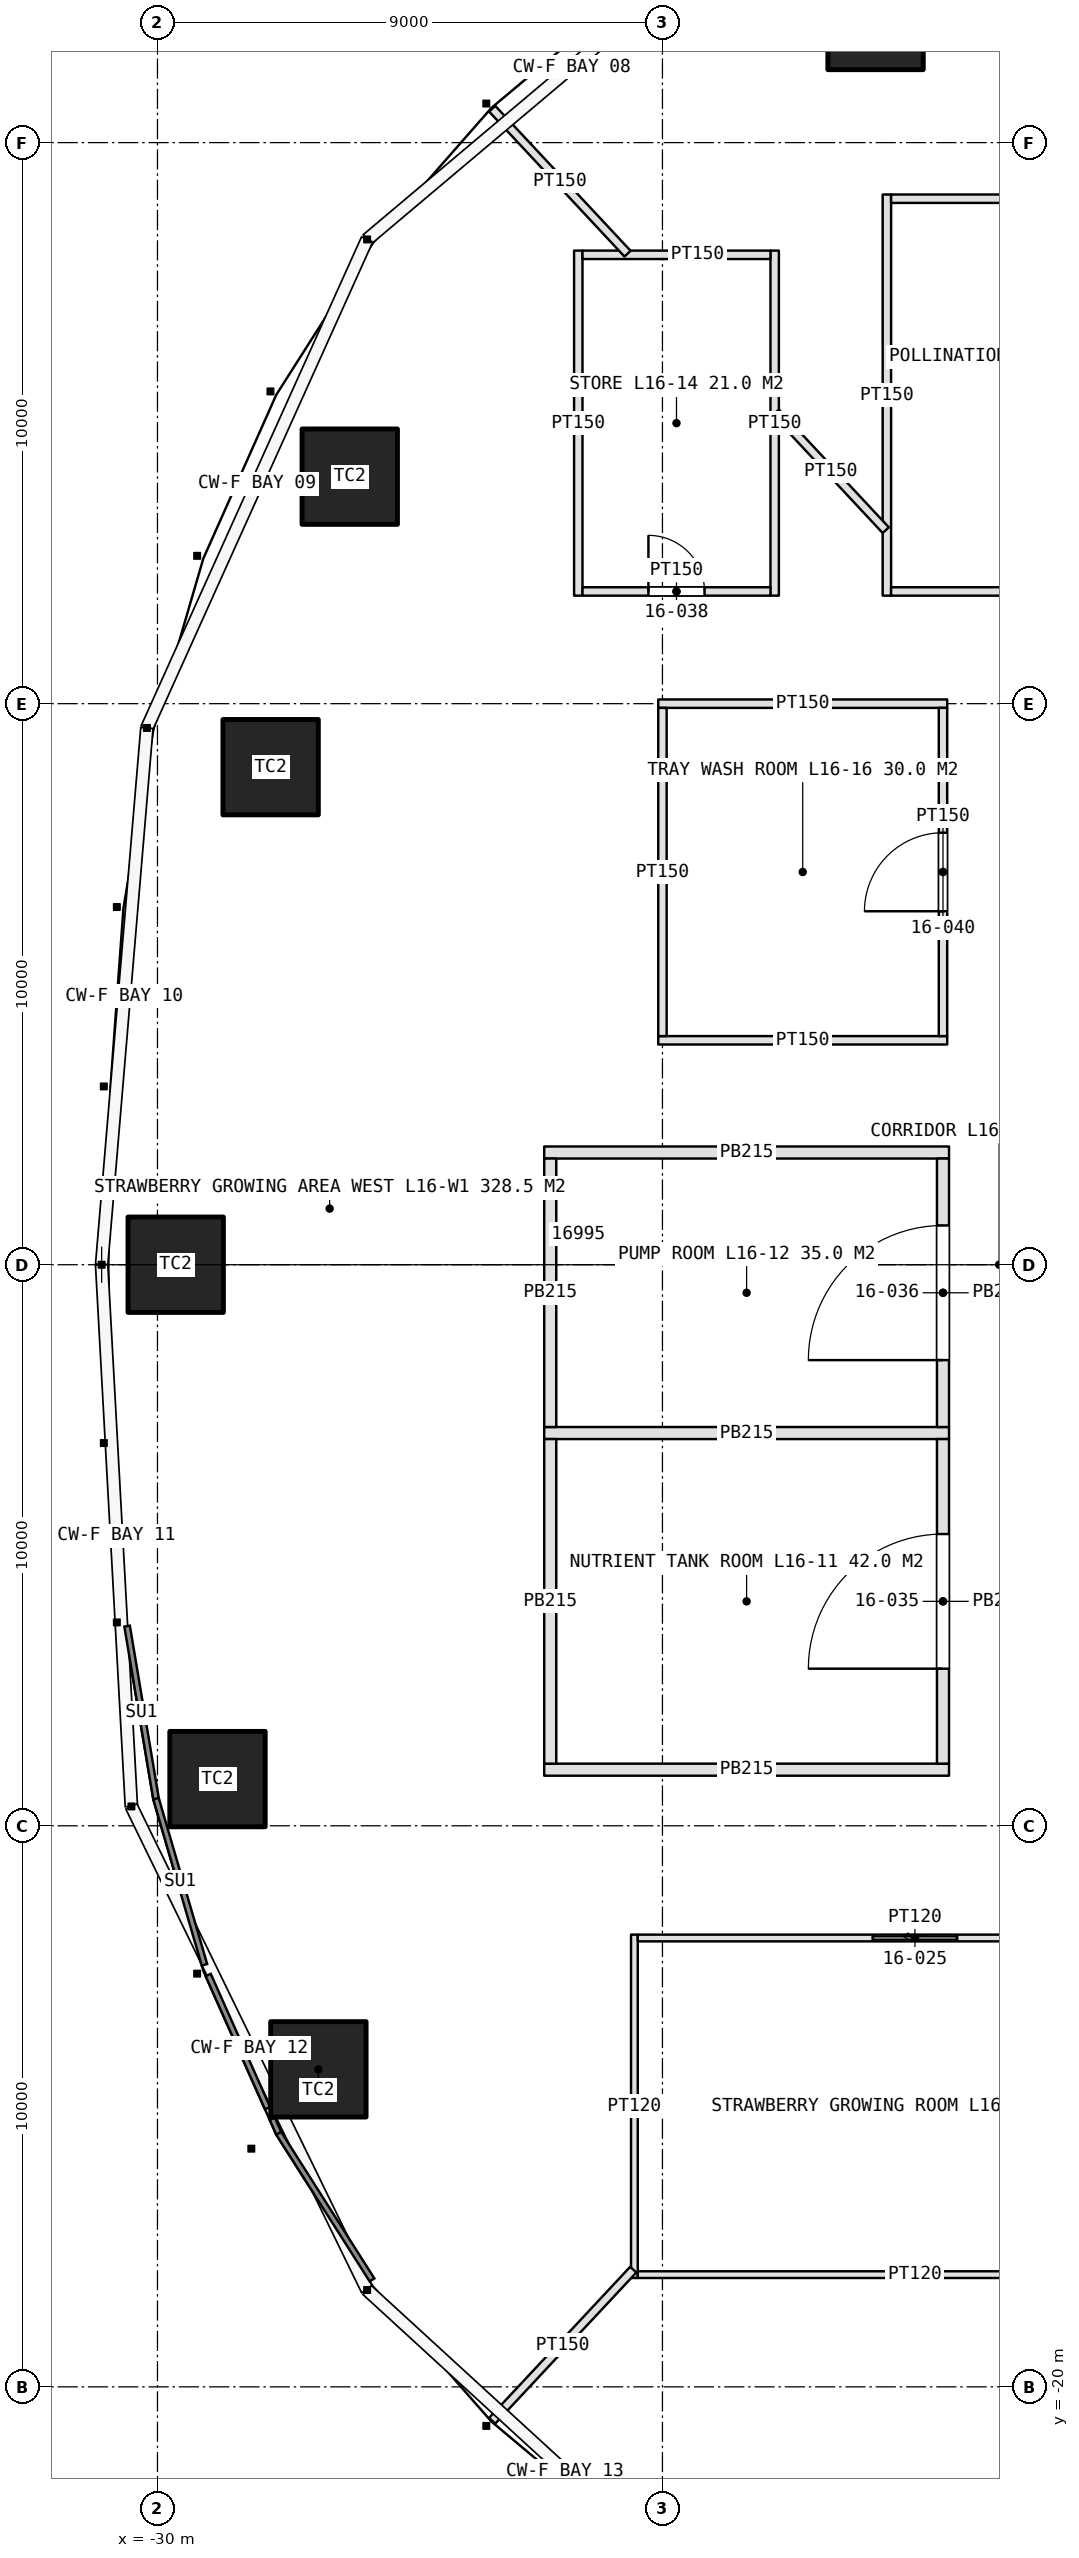
"""IFC4 building model, lengths in metres.
Left out: names, types, materials, properties, quantities, classifications, styles, units other than length and angle.
Written with IfcOpenShell. Run it as: python <this file> out.ifc"""

import sys

from ifc_helpers import new_model, si_unit, direction, frame, frame_2d, origin, origin_2d, place, context, subcontext, project, spatial, rectangle, extrude, element, fill, save


model = new_model("IFC4")
c1 = context("Model", 3, precision=1e-05, world=origin(), true_north=direction((0.0, 1.0)))
c2 = subcontext(c1, "Body", "Model", "MODEL_VIEW")
j1 = project(units=[si_unit("LENGTHUNIT", "METRE"), si_unit("PLANEANGLEUNIT", "RADIAN")], contexts=[c1])
p1 = place(None, origin())
s1 = spatial("IfcSite", under=j1, at=p1, CompositionType="ELEMENT")
p2 = place(p1, origin())
s2 = spatial("IfcBuilding", under=s1, at=p2, CompositionType="ELEMENT")
p3 = place(p2, frame((0.0, 0.0, 80.0)))
s3 = spatial("IfcBuildingStorey", under=s2, at=p3, CompositionType="ELEMENT", Elevation=80.0)
for number, where, z_axis, x_axis in (
    (1, (-17.202, 22.15, 0.0), (0.0, 0.0, 1.0), (1.0, 0.0, 0.0)),
    (2, (-26.573, 14.046, 0.0), (0.0, 0.0, 1.0), (1.0, 0.0, 0.0)),
    (3, (-27.983, 8.868, 0.0), (0.0, 0.0, 1.0), (1.0, 0.0, 0.0)),
    (4, (-29.675, 0.0, 0.0), (0.0, 0.0, 1.0), (1.0, 0.0, 0.0)),
    (5, (-28.93, -9.168, 0.0), (0.0, 0.0, 1.0), (1.0, 0.0, 0.0)),
    (6, (-27.132, -14.341, 0.0), (0.0, 0.0, 1.0), (1.0, 0.0, 0.0)),
):
    element("IfcColumn", number, at=place(p3, frame(where, z_axis=z_axis, x_axis=x_axis)), inside=s3, PredefinedType="COLUMN", context=c2, shape_type="SweptSolid", body=[
        extrude(rectangle(XDim=1.7, YDim=1.7, at=origin_2d()), origin(), (0.0, 0.0, 1.0), 5.0),
    ])
p4 = place(p3, frame((-21.5, -11.94, 0.0), z_axis=(0.0, 0.0, 1.0), x_axis=(0.0, -1.0, 0.0)))
e7 = element("IfcWall", 7, at=p4, inside=s3, PredefinedType="PARTITIONING", context=c2, shape_type="SweptSolid", body=[
    extrude(rectangle(XDim=6.12, YDim=0.12, at=frame_2d((3.06, 0.0))), origin(), (0.0, 0.0, 1.0), 3.6),
])
p5 = place(p3, frame((-21.44, -12.0, 0.0), z_axis=(0.0, 0.0, 1.0), x_axis=(1.0, 0.0, 0.0)))
e8 = element("IfcWall", 8, at=p5, inside=s3, PredefinedType="PARTITIONING", context=c2, shape_type="SweptSolid", body=[
    extrude(rectangle(XDim=9.88, YDim=0.12, at=frame_2d((4.94, 0.0))), origin(), (0.0, 0.0, 1.0), 3.6),
])
p6 = place(p5, frame((4.19, 0.0, 0.0)))
e9 = element("IfcOpeningElement", 9, at=p6, cuts=e8, PredefinedType="OPENING", context=c2, shape_type="SweptSolid", body=[
    extrude(rectangle(XDim=1.5, YDim=2.5, at=frame_2d((0.75, 1.25))), frame((0.0, 0.07, 0.0), z_axis=(0.0, -1.0, 0.0), x_axis=(1.0, 0.0, 0.0)), (0.0, 0.0, 1.0), 0.14),
])
p7 = place(p3, frame((-21.44, -18.0, 0.0), z_axis=(0.0, 0.0, 1.0), x_axis=(1.0, 0.0, 0.0)))
e10 = element("IfcWall", 10, at=p7, inside=s3, PredefinedType="PARTITIONING", context=c2, shape_type="SweptSolid", body=[
    extrude(rectangle(XDim=9.88, YDim=0.12, at=frame_2d((4.94, 0.0))), origin(), (0.0, 0.0, 1.0), 3.6),
])
p8 = place(p3, frame((-17.0, 11.925, 0.0), z_axis=(0.0, 0.0, 1.0), x_axis=(0.0, 1.0, 0.0)))
e11 = element("IfcWall", 11, at=p8, inside=s3, PredefinedType="PARTITIONING", context=c2, shape_type="SweptSolid", body=[
    extrude(rectangle(XDim=7.15, YDim=0.15, at=frame_2d((3.575, 0.0))), origin(), (0.0, 0.0, 1.0), 3.6),
])
p9 = place(p3, frame((-16.925, 12.0, 0.0), z_axis=(0.0, 0.0, 1.0), x_axis=(1.0, 0.0, 0.0)))
e12 = element("IfcWall", 12, at=p9, inside=s3, PredefinedType="PARTITIONING", context=c2, shape_type="SweptSolid", body=[
    extrude(rectangle(XDim=5.85, YDim=0.15, at=frame_2d((2.925, 0.0))), origin(), (0.0, 0.0, 1.0), 3.6),
])
p10 = place(p9, frame((2.425, 0.0, 0.0)))
e13 = element("IfcOpeningElement", 13, at=p10, cuts=e12, PredefinedType="OPENING", context=c2, shape_type="SweptSolid", body=[
    extrude(rectangle(XDim=1.0, YDim=2.2, at=frame_2d((0.5, 1.1))), frame((0.0, 0.085, 0.0), z_axis=(0.0, -1.0, 0.0), x_axis=(1.0, 0.0, 0.0)), (0.0, 0.0, 1.0), 0.17),
])
p11 = place(p3, frame((-16.925, 19.0, 0.0), z_axis=(0.0, 0.0, 1.0), x_axis=(1.0, 0.0, 0.0)))
e14 = element("IfcWall", 14, at=p11, inside=s3, PredefinedType="PARTITIONING", context=c2, shape_type="SweptSolid", body=[
    extrude(rectangle(XDim=5.85, YDim=0.15, at=frame_2d((2.925, 0.0))), origin(), (0.0, 0.0, 1.0), 3.6),
])
for number, where, z_axis, x_axis in (
    (15, (-15.893, -9.0, 0.0), (0.0, 0.0, 1.0), (-1.0, 0.0, 0.0)),
    (16, (-15.893, -3.0, 0.0), (0.0, 0.0, 1.0), (-1.0, 0.0, 0.0)),
    (17, (-15.893, 2.0, 0.0), (0.0, 0.0, 1.0), (-1.0, 0.0, 0.0)),
):
    element("IfcWall", number, at=place(p3, frame(where, z_axis=z_axis, x_axis=x_axis)), inside=s3, PredefinedType="PARTITIONING", context=c2, shape_type="SweptSolid", body=[
        extrude(rectangle(XDim=7.215, YDim=0.215, at=frame_2d((3.607, 0.0))), origin(), (0.0, 0.0, 1.0), 3.6),
    ])
p12 = place(p3, frame((-16.0, -8.893, 0.0), z_axis=(0.0, 0.0, 1.0), x_axis=(0.0, 1.0, 0.0)))
e18 = element("IfcWall", 18, at=p12, inside=s3, PredefinedType="PARTITIONING", context=c2, shape_type="SweptSolid", body=[
    extrude(rectangle(XDim=5.785, YDim=0.215, at=frame_2d((2.893, 0.0))), origin(), (0.0, 0.0, 1.0), 3.6),
])
p13 = place(p12, frame((1.692, 0.0, 0.0)))
e19 = element("IfcOpeningElement", 19, at=p13, cuts=e18, PredefinedType="OPENING", context=c2, shape_type="SweptSolid", body=[
    extrude(rectangle(XDim=2.4, YDim=2.4, at=frame_2d((1.2, 1.2))), frame((0.0, 0.118, 0.0), z_axis=(0.0, -1.0, 0.0), x_axis=(1.0, 0.0, 0.0)), (0.0, 0.0, 1.0), 0.235),
])
p14 = place(p3, frame((-23.0, -8.893, 0.0), z_axis=(0.0, 0.0, 1.0), x_axis=(0.0, 1.0, 0.0)))
e20 = element("IfcWall", 20, at=p14, inside=s3, PredefinedType="PARTITIONING", context=c2, shape_type="SweptSolid", body=[
    extrude(rectangle(XDim=5.785, YDim=0.215, at=frame_2d((2.893, 0.0))), origin(), (0.0, 0.0, 1.0), 3.6),
])
p15 = place(p3, frame((-16.0, -2.893, 0.0), z_axis=(0.0, 0.0, 1.0), x_axis=(0.0, 1.0, 0.0)))
e21 = element("IfcWall", 21, at=p15, inside=s3, PredefinedType="PARTITIONING", context=c2, shape_type="SweptSolid", body=[
    extrude(rectangle(XDim=4.785, YDim=0.215, at=frame_2d((2.393, 0.0))), origin(), (0.0, 0.0, 1.0), 3.6),
])
p16 = place(p15, frame((1.192, 0.0, 0.0)))
e22 = element("IfcOpeningElement", 22, at=p16, cuts=e21, PredefinedType="OPENING", context=c2, shape_type="SweptSolid", body=[
    extrude(rectangle(XDim=2.4, YDim=2.4, at=frame_2d((1.2, 1.2))), frame((0.0, 0.118, 0.0), z_axis=(0.0, -1.0, 0.0), x_axis=(1.0, 0.0, 0.0)), (0.0, 0.0, 1.0), 0.235),
])
p17 = place(p3, frame((-23.0, -2.893, 0.0), z_axis=(0.0, 0.0, 1.0), x_axis=(0.0, 1.0, 0.0)))
e23 = element("IfcWall", 23, at=p17, inside=s3, PredefinedType="PARTITIONING", context=c2, shape_type="SweptSolid", body=[
    extrude(rectangle(XDim=4.785, YDim=0.215, at=frame_2d((2.393, 0.0))), origin(), (0.0, 0.0, 1.0), 3.6),
])
for number, where, z_axis, x_axis in (
    (24, (-22.5, 11.925, 0.0), (0.0, 0.0, 1.0), (0.0, 1.0, 0.0)),
    (25, (-19.0, 11.925, 0.0), (0.0, 0.0, 1.0), (0.0, 1.0, 0.0)),
):
    element("IfcWall", number, at=place(p3, frame(where, z_axis=z_axis, x_axis=x_axis)), inside=s3, PredefinedType="PARTITIONING", context=c2, shape_type="SweptSolid", body=[
        extrude(rectangle(XDim=6.15, YDim=0.15, at=frame_2d((3.075, 0.0))), origin(), (0.0, 0.0, 1.0), 3.6),
    ])
p18 = place(p3, frame((-22.425, 12.0, 0.0), z_axis=(0.0, 0.0, 1.0), x_axis=(1.0, 0.0, 0.0)))
e26 = element("IfcWall", 26, at=p18, inside=s3, PredefinedType="PARTITIONING", context=c2, shape_type="SweptSolid", body=[
    extrude(rectangle(XDim=3.35, YDim=0.15, at=frame_2d((1.675, 0.0))), origin(), (0.0, 0.0, 1.0), 3.6),
])
p19 = place(p18, frame((1.175, 0.0, 0.0)))
e27 = element("IfcOpeningElement", 27, at=p19, cuts=e26, PredefinedType="OPENING", context=c2, shape_type="SweptSolid", body=[
    extrude(rectangle(XDim=1.0, YDim=2.2, at=frame_2d((0.5, 1.1))), frame((0.0, 0.085, 0.0), z_axis=(0.0, -1.0, 0.0), x_axis=(1.0, 0.0, 0.0)), (0.0, 0.0, 1.0), 0.17),
])
p20 = place(p3, frame((-22.425, 18.0, 0.0), z_axis=(0.0, 0.0, 1.0), x_axis=(1.0, 0.0, 0.0)))
e28 = element("IfcWall", 28, at=p20, inside=s3, PredefinedType="PARTITIONING", context=c2, shape_type="SweptSolid", body=[
    extrude(rectangle(XDim=3.35, YDim=0.15, at=frame_2d((1.675, 0.0))), origin(), (0.0, 0.0, 1.0), 3.6),
])
for number, where, z_axis, x_axis in (
    (29, (-15.925, 4.0, 0.0), (0.0, 0.0, 1.0), (-1.0, 0.0, 0.0)),
    (30, (-15.925, 10.0, 0.0), (0.0, 0.0, 1.0), (-1.0, 0.0, 0.0)),
):
    element("IfcWall", number, at=place(p3, frame(where, z_axis=z_axis, x_axis=x_axis)), inside=s3, PredefinedType="PARTITIONING", context=c2, shape_type="SweptSolid", body=[
        extrude(rectangle(XDim=5.15, YDim=0.15, at=frame_2d((2.575, 0.0))), origin(), (0.0, 0.0, 1.0), 3.6),
    ])
p21 = place(p3, frame((-16.0, 4.075, 0.0), z_axis=(0.0, 0.0, 1.0), x_axis=(0.0, 1.0, 0.0)))
e31 = element("IfcWall", 31, at=p21, inside=s3, PredefinedType="PARTITIONING", context=c2, shape_type="SweptSolid", body=[
    extrude(rectangle(XDim=5.85, YDim=0.15, at=frame_2d((2.925, 0.0))), origin(), (0.0, 0.0, 1.0), 3.6),
])
p22 = place(p21, frame((2.225, 0.0, 0.0)))
e32 = element("IfcOpeningElement", 32, at=p22, cuts=e31, PredefinedType="OPENING", context=c2, shape_type="SweptSolid", body=[
    extrude(rectangle(XDim=1.4, YDim=2.4, at=frame_2d((0.7, 1.2))), frame((0.0, 0.085, 0.0), z_axis=(0.0, -1.0, 0.0), x_axis=(1.0, 0.0, 0.0)), (0.0, 0.0, 1.0), 0.17),
])
p23 = place(p3, frame((-21.0, 4.075, 0.0), z_axis=(0.0, 0.0, 1.0), x_axis=(0.0, 1.0, 0.0)))
e33 = element("IfcWall", 33, at=p23, inside=s3, PredefinedType="PARTITIONING", context=c2, shape_type="SweptSolid", body=[
    extrude(rectangle(XDim=5.85, YDim=0.15, at=frame_2d((2.925, 0.0))), origin(), (0.0, 0.0, 1.0), 3.6),
])
p24 = place(p3, frame((-21.52, -17.911, 0.0), z_axis=(0.0, 0.0, 1.0), x_axis=(-0.682507100249, -0.730878962694, 0.0)))
e34 = element("IfcWall", 34, at=p24, inside=s3, PredefinedType="PARTITIONING", context=c2, shape_type="SweptSolid", body=[
    extrude(rectangle(XDim=3.684, YDim=0.15, at=frame_2d((1.842, 0.0))), origin(), (0.0, 0.0, 1.0), 3.6),
])
p25 = place(p3, frame((-21.622, 18.02, 0.0), z_axis=(0.0, 0.0, 1.0), x_axis=(-0.682522451791, 0.730864626864, 0.0)))
e35 = element("IfcWall", 35, at=p25, inside=s3, PredefinedType="PARTITIONING", context=c2, shape_type="SweptSolid", body=[
    extrude(rectangle(XDim=3.535, YDim=0.15, at=frame_2d((1.768, 0.0))), origin(), (0.0, 0.0, 1.0), 3.6),
])
p26 = place(p3, frame((-17.02, 13.092, 0.0), z_axis=(0.0, 0.0, 1.0), x_axis=(-0.682506029746, 0.730879962347, 0.0)))
e36 = element("IfcWall", 36, at=p26, inside=s3, PredefinedType="PARTITIONING", context=c2, shape_type="SweptSolid", body=[
    extrude(rectangle(XDim=2.872, YDim=0.15, at=frame_2d((1.436, 0.0))), origin(), (0.0, 0.0, 1.0), 3.6),
])
p27 = place(p6, origin())
e37 = element("IfcDoor", 37, at=p27, inside=s3, OperationType="SLIDING_TO_LEFT", PredefinedType="DOOR", context=c2, shape_type="SweptSolid", body=[
    extrude(rectangle(XDim=1.5, YDim=2.5, at=frame_2d((0.75, 1.25))), frame((0.0, 0.025, 0.0), z_axis=(0.0, -1.0, 0.0), x_axis=(1.0, 0.0, 0.0)), (0.0, 0.0, 1.0), 0.05),
])
fill(e9, e37)
p28 = place(p13, origin())
e38 = element("IfcDoor", 38, at=p28, inside=s3, OperationType="DOUBLE_DOOR_SINGLE_SWING", PredefinedType="DOOR", context=c2, shape_type="SweptSolid", body=[
    extrude(rectangle(XDim=2.4, YDim=2.4, at=frame_2d((1.2, 1.2))), frame((0.0, 0.025, 0.0), z_axis=(0.0, -1.0, 0.0), x_axis=(1.0, 0.0, 0.0)), (0.0, 0.0, 1.0), 0.05),
])
fill(e19, e38)
p29 = place(p16, origin())
e39 = element("IfcDoor", 39, at=p29, inside=s3, OperationType="DOUBLE_DOOR_SINGLE_SWING", PredefinedType="DOOR", context=c2, shape_type="SweptSolid", body=[
    extrude(rectangle(XDim=2.4, YDim=2.4, at=frame_2d((1.2, 1.2))), frame((0.0, 0.025, 0.0), z_axis=(0.0, -1.0, 0.0), x_axis=(1.0, 0.0, 0.0)), (0.0, 0.0, 1.0), 0.05),
])
fill(e22, e39)
p30 = place(p19, origin())
e40 = element("IfcDoor", 40, at=p30, inside=s3, OperationType="SINGLE_SWING_LEFT", PredefinedType="DOOR", context=c2, shape_type="SweptSolid", body=[
    extrude(rectangle(XDim=1.0, YDim=2.2, at=frame_2d((0.5, 1.1))), frame((0.0, 0.025, 0.0), z_axis=(0.0, -1.0, 0.0), x_axis=(1.0, 0.0, 0.0)), (0.0, 0.0, 1.0), 0.05),
])
fill(e27, e40)
p31 = place(p22, origin())
e41 = element("IfcDoor", 41, at=p31, inside=s3, OperationType="DOUBLE_DOOR_DOUBLE_SWING", PredefinedType="DOOR", context=c2, shape_type="SweptSolid", body=[
    extrude(rectangle(XDim=1.4, YDim=2.4, at=frame_2d((0.7, 1.2))), frame((0.0, 0.025, 0.0), z_axis=(0.0, -1.0, 0.0), x_axis=(1.0, 0.0, 0.0)), (0.0, 0.0, 1.0), 0.05),
])
fill(e32, e41)
save(model, sys.argv[1])
